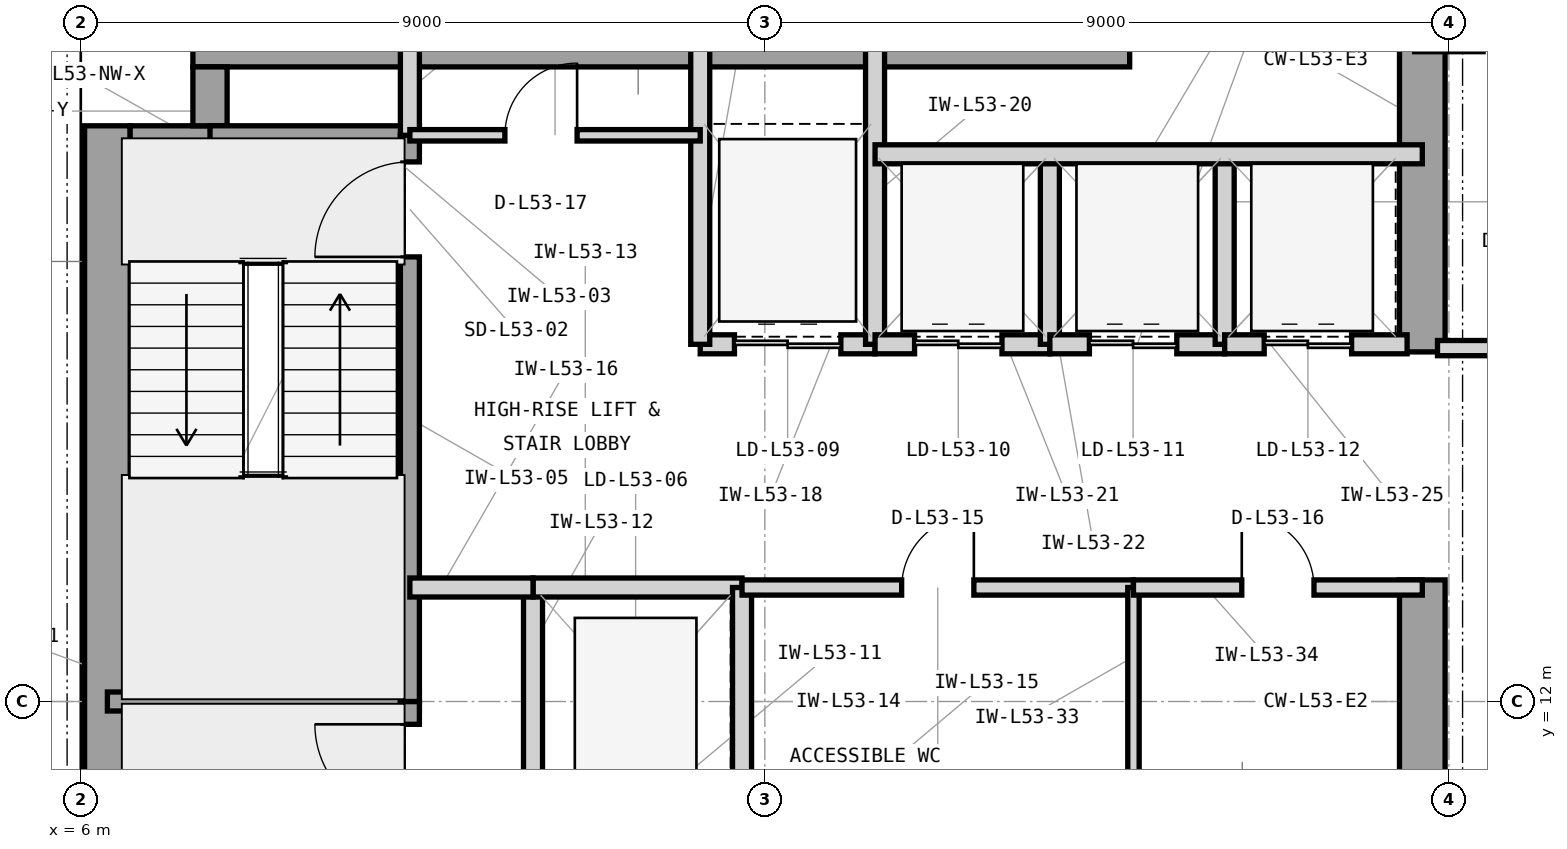
"""IFC4 building model, lengths in metres.
Left out: names, types, materials, properties, quantities, classifications, styles, units other than length and angle.
Written with IfcOpenShell. Run it as: python <this file> out.ifc"""

import sys

from ifc_helpers import new_model, si_unit, direction, frame, frame_2d, origin, place, context, subcontext, project, spatial, rectangle, extrude, element, fill, save


model = new_model("IFC4")
c1 = context("Model", 3, precision=1e-05, world=origin(), true_north=direction((0.0, 1.0)))
c2 = subcontext(c1, "Body", "Model", "MODEL_VIEW")
j1 = project(units=[si_unit("LENGTHUNIT", "METRE"), si_unit("PLANEANGLEUNIT", "RADIAN")], contexts=[c1])
p1 = place(None, origin())
s1 = spatial("IfcSite", under=j1, at=p1, CompositionType="ELEMENT")
p2 = place(p1, origin())
s2 = spatial("IfcBuilding", under=s1, at=p2, CompositionType="ELEMENT")
p3 = place(p2, frame((0.0, 0.0, 219.0)))
s3 = spatial("IfcBuildingStorey", under=s2, at=p3, CompositionType="ELEMENT", Elevation=219.0)
p4 = place(p3, frame((6.35, 4.425, 0.0), z_axis=(0.0, 0.0, 1.0), x_axis=(0.0, 1.0, 0.0)))
e1 = element("IfcWall", 1, at=p4, inside=s3, PredefinedType="SHEAR", context=c2, shape_type="SweptSolid", body=[
    extrude(rectangle(XDim=15.15, YDim=0.6, at=frame_2d((7.575, 0.0))), origin(), (0.0, 0.0, 1.0), 3.9),
])
p5 = place(p3, frame((7.475, 20.65, 0.0), z_axis=(0.0, 0.0, 1.0), x_axis=(1.0, 0.0, 0.0)))
e2 = element("IfcWall", 2, at=p5, inside=s3, PredefinedType="SHEAR", context=c2, shape_type="SweptSolid", body=[
    extrude(rectangle(XDim=12.325, YDim=0.6, at=frame_2d((6.163, 0.0))), origin(), (0.0, 0.0, 1.0), 3.9),
])
p6 = place(p3, frame((23.65, 10.4, 0.0), z_axis=(0.0, 0.0, 1.0), x_axis=(0.0, 1.0, 0.0)))
e3 = element("IfcWall", 3, at=p6, inside=s3, PredefinedType="SHEAR", context=c2, shape_type="SweptSolid", body=[
    extrude(rectangle(XDim=3.2, YDim=0.6, at=frame_2d((1.6, 0.0))), origin(), (0.0, 0.0, 1.0), 3.9),
])
p7 = place(p3, frame((23.65, 16.6, 0.0), z_axis=(0.0, 0.0, 1.0), x_axis=(0.0, 1.0, 0.0)))
e4 = element("IfcWall", 4, at=p7, inside=s3, PredefinedType="SHEAR", context=c2, shape_type="SweptSolid", body=[
    extrude(rectangle(XDim=4.05, YDim=0.6, at=frame_2d((2.025, 0.0))), origin(), (0.0, 0.0, 1.0), 3.9),
])
p8 = place(p3, frame((6.65, 19.35, 0.0), z_axis=(0.0, 0.0, 1.0), x_axis=(1.0, 0.0, 0.0)))
e5 = element("IfcWall", 5, at=p8, inside=s3, PredefinedType="SHEAR", context=c2, shape_type="SweptSolid", body=[
    extrude(rectangle(XDim=1.275, YDim=0.45, at=frame_2d((0.638, 0.0))), origin(), (0.0, 0.0, 1.0), 3.9),
])
p9 = place(p3, frame((7.7, 19.575, 0.0), z_axis=(0.0, 0.0, 1.0), x_axis=(0.0, 1.0, 0.0)))
e6 = element("IfcWall", 6, at=p9, inside=s3, PredefinedType="SHEAR", context=c2, shape_type="SweptSolid", body=[
    extrude(rectangle(XDim=0.775, YDim=0.45, at=frame_2d((0.388, 0.0))), origin(), (0.0, 0.0, 1.0), 3.9),
])
p10 = place(p3, frame((6.35, 12.0, 0.0), z_axis=(0.0, 0.0, 1.0), x_axis=(1.0, 0.0, 0.0)))
e7 = element("IfcWall", 7, at=p10, inside=s3, PredefinedType="SHEAR", context=c2, shape_type="SweptSolid", body=[
    extrude(rectangle(XDim=4.105, YDim=0.25, at=frame_2d((2.052, 0.0))), origin(), (0.0, 0.0, 1.0), 3.9),
])
p11 = place(p3, frame((7.7, 19.45, 0.0), z_axis=(0.0, 0.0, 1.0), x_axis=(1.0, 0.0, 0.0)))
e8 = element("IfcWall", 8, at=p11, inside=s3, PredefinedType="SHEAR", context=c2, shape_type="SweptSolid", body=[
    extrude(rectangle(XDim=2.755, YDim=0.25, at=frame_2d((1.377, 0.0))), origin(), (0.0, 0.0, 1.0), 3.9),
])
p12 = place(p3, frame((10.33, 4.55, 0.0), z_axis=(0.0, 0.0, 1.0), x_axis=(0.0, 1.0, 0.0)))
e9 = element("IfcWall", 9, at=p12, inside=s3, PredefinedType="SHEAR", context=c2, shape_type="SweptSolid", body=[
    extrude(rectangle(XDim=7.45, YDim=0.25, at=frame_2d((3.725, 0.0))), origin(), (0.0, 0.0, 1.0), 3.9),
])
p13 = place(p12, frame((5.9, 0.0, 0.0)))
e10 = element("IfcOpeningElement", 10, at=p13, cuts=e9, PredefinedType="OPENING", context=c2, shape_type="SweptSolid", body=[
    extrude(rectangle(XDim=1.25, YDim=2.2, at=frame_2d((0.625, 1.1))), frame((0.0, 0.135, 0.0), z_axis=(0.0, -1.0, 0.0), x_axis=(1.0, 0.0, 0.0)), (0.0, 0.0, 1.0), 0.27),
])
p14 = place(p3, frame((10.33, 12.0, 0.0), z_axis=(0.0, 0.0, 1.0), x_axis=(0.0, 1.0, 0.0)))
e11 = element("IfcWall", 11, at=p14, inside=s3, PredefinedType="SHEAR", context=c2, shape_type="SweptSolid", body=[
    extrude(rectangle(XDim=7.45, YDim=0.25, at=frame_2d((3.725, 0.0))), origin(), (0.0, 0.0, 1.0), 3.9),
])
p15 = place(p14, frame((5.85, 0.0, 0.0)))
e12 = element("IfcOpeningElement", 12, at=p15, cuts=e11, PredefinedType="OPENING", context=c2, shape_type="SweptSolid", body=[
    extrude(rectangle(XDim=1.25, YDim=2.2, at=frame_2d((0.625, 1.1))), frame((0.0, 0.135, 0.0), z_axis=(0.0, -1.0, 0.0), x_axis=(1.0, 0.0, 0.0)), (0.0, 0.0, 1.0), 0.27),
])
p16 = place(p3, frame((10.33, 19.45, 0.0), z_axis=(0.0, 0.0, 1.0), x_axis=(0.0, 1.0, 0.0)))
e13 = element("IfcWall", 13, at=p16, inside=s3, PredefinedType="PARTITIONING", context=c2, shape_type="SweptSolid", body=[
    extrude(rectangle(XDim=1.2, YDim=0.25, at=frame_2d((0.6, 0.0))), origin(), (0.0, 0.0, 1.0), 3.64),
])
p17 = place(p3, frame((11.95, 10.5, 0.0), z_axis=(0.0, 0.0, 1.0), x_axis=(0.0, 1.0, 0.0)))
e14 = element("IfcWall", 14, at=p17, inside=s3, PredefinedType="PARTITIONING", context=c2, shape_type="SweptSolid", body=[
    extrude(rectangle(XDim=3.0, YDim=0.25, at=frame_2d((1.5, 0.0))), origin(), (0.0, 0.0, 1.0), 3.64),
])
p18 = place(p3, frame((11.95, 13.5, 0.0), z_axis=(0.0, 0.0, 1.0), x_axis=(1.0, 0.0, 0.0)))
e15 = element("IfcWall", 15, at=p18, inside=s3, PredefinedType="PARTITIONING", context=c2, shape_type="SweptSolid", body=[
    extrude(rectangle(XDim=2.75, YDim=0.25, at=frame_2d((1.375, 0.0))), origin(), (0.0, 0.0, 1.0), 3.283),
])
p19 = place(p3, frame((14.7, 10.5, 0.0), z_axis=(0.0, 0.0, 1.0), x_axis=(0.0, 1.0, 0.0)))
e16 = element("IfcWall", 16, at=p19, inside=s3, PredefinedType="PARTITIONING", context=c2, shape_type="SweptSolid", body=[
    extrude(rectangle(XDim=3.0, YDim=0.25, at=frame_2d((1.5, 0.0))), origin(), (0.0, 0.0, 1.0), 3.64),
])
p20 = place(p3, frame((10.33, 13.5, 0.0), z_axis=(0.0, 0.0, 1.0), x_axis=(1.0, 0.0, 0.0)))
e17 = element("IfcWall", 17, at=p20, inside=s3, PredefinedType="PARTITIONING", context=c2, shape_type="SweptSolid", body=[
    extrude(rectangle(XDim=1.62, YDim=0.25, at=frame_2d((0.81, 0.0))), origin(), (0.0, 0.0, 1.0), 3.283),
])
p21 = place(p3, frame((14.15, 16.7, 0.0), z_axis=(0.0, 0.0, 1.0), x_axis=(1.0, 0.0, 0.0)))
e18 = element("IfcWall", 18, at=p21, inside=s3, PredefinedType="PARTITIONING", context=c2, shape_type="SweptSolid", body=[
    extrude(rectangle(XDim=2.3, YDim=0.25, at=frame_2d((1.15, 0.0))), origin(), (0.0, 0.0, 1.0), 3.283),
])
p22 = place(p21, frame((0.45, 0.0, 0.0)))
e19 = element("IfcOpeningElement", 19, at=p22, cuts=e18, PredefinedType="OPENING", context=c2, shape_type="SweptSolid", body=[
    extrude(rectangle(XDim=1.4, YDim=2.35, at=frame_2d((0.7, 1.175))), frame((0.0, 0.135, 0.0), z_axis=(0.0, -1.0, 0.0), x_axis=(1.0, 0.0, 0.0)), (0.0, 0.0, 1.0), 0.27),
])
for number, where, z_axis, x_axis in (
    (20, (14.15, 16.7, 0.0), (0.0, 0.0, 1.0), (0.0, 1.0, 0.0)),
    (21, (16.45, 16.7, 0.0), (0.0, 0.0, 1.0), (0.0, 1.0, 0.0)),
):
    element("IfcWall", number, at=place(p3, frame(where, z_axis=z_axis, x_axis=x_axis)), inside=s3, PredefinedType="PARTITIONING", context=c2, shape_type="SweptSolid", body=[
        extrude(rectangle(XDim=3.95, YDim=0.25, at=frame_2d((1.975, 0.0))), origin(), (0.0, 0.0, 1.0), 3.64),
    ])
p23 = place(p3, frame((16.45, 16.7, 0.0), z_axis=(0.0, 0.0, 1.0), x_axis=(1.0, 0.0, 0.0)))
e22 = element("IfcWall", 22, at=p23, inside=s3, PredefinedType="PARTITIONING", context=c2, shape_type="SweptSolid", body=[
    extrude(rectangle(XDim=2.3, YDim=0.25, at=frame_2d((1.15, 0.0))), origin(), (0.0, 0.0, 1.0), 3.283),
])
p24 = place(p23, frame((0.52, 0.0, 0.0)))
e23 = element("IfcOpeningElement", 23, at=p24, cuts=e22, PredefinedType="OPENING", context=c2, shape_type="SweptSolid", body=[
    extrude(rectangle(XDim=1.15, YDim=2.25, at=frame_2d((0.575, 1.125))), frame((0.0, 0.135, 0.0), z_axis=(0.0, -1.0, 0.0), x_axis=(1.0, 0.0, 0.0)), (0.0, 0.0, 1.0), 0.27),
])
p25 = place(p3, frame((18.75, 16.7, 0.0), z_axis=(0.0, 0.0, 1.0), x_axis=(0.0, 1.0, 0.0)))
e24 = element("IfcWall", 24, at=p25, inside=s3, PredefinedType="PARTITIONING", context=c2, shape_type="SweptSolid", body=[
    extrude(rectangle(XDim=2.5, YDim=0.25, at=frame_2d((1.25, 0.0))), origin(), (0.0, 0.0, 1.0), 3.64),
])
p26 = place(p3, frame((18.75, 16.7, 0.0), z_axis=(0.0, 0.0, 1.0), x_axis=(1.0, 0.0, 0.0)))
e25 = element("IfcWall", 25, at=p26, inside=s3, PredefinedType="PARTITIONING", context=c2, shape_type="SweptSolid", body=[
    extrude(rectangle(XDim=2.3, YDim=0.25, at=frame_2d((1.15, 0.0))), origin(), (0.0, 0.0, 1.0), 3.283),
])
p27 = place(p26, frame((0.52, 0.0, 0.0)))
e26 = element("IfcOpeningElement", 26, at=p27, cuts=e25, PredefinedType="OPENING", context=c2, shape_type="SweptSolid", body=[
    extrude(rectangle(XDim=1.15, YDim=2.25, at=frame_2d((0.575, 1.125))), frame((0.0, 0.135, 0.0), z_axis=(0.0, -1.0, 0.0), x_axis=(1.0, 0.0, 0.0)), (0.0, 0.0, 1.0), 0.27),
])
p28 = place(p3, frame((21.05, 16.7, 0.0), z_axis=(0.0, 0.0, 1.0), x_axis=(0.0, 1.0, 0.0)))
e27 = element("IfcWall", 27, at=p28, inside=s3, PredefinedType="PARTITIONING", context=c2, shape_type="SweptSolid", body=[
    extrude(rectangle(XDim=2.5, YDim=0.25, at=frame_2d((1.25, 0.0))), origin(), (0.0, 0.0, 1.0), 3.64),
])
p29 = place(p3, frame((21.05, 16.7, 0.0), z_axis=(0.0, 0.0, 1.0), x_axis=(1.0, 0.0, 0.0)))
e28 = element("IfcWall", 28, at=p29, inside=s3, PredefinedType="PARTITIONING", context=c2, shape_type="SweptSolid", body=[
    extrude(rectangle(XDim=2.4, YDim=0.25, at=frame_2d((1.2, 0.0))), origin(), (0.0, 0.0, 1.0), 3.283),
])
p30 = place(p29, frame((0.52, 0.0, 0.0)))
e29 = element("IfcOpeningElement", 29, at=p30, cuts=e28, PredefinedType="OPENING", context=c2, shape_type="SweptSolid", body=[
    extrude(rectangle(XDim=1.15, YDim=2.25, at=frame_2d((0.575, 1.125))), frame((0.0, 0.135, 0.0), z_axis=(0.0, -1.0, 0.0), x_axis=(1.0, 0.0, 0.0)), (0.0, 0.0, 1.0), 0.27),
])
p31 = place(p3, frame((16.45, 19.2, 0.0), z_axis=(0.0, 0.0, 1.0), x_axis=(1.0, 0.0, 0.0)))
e30 = element("IfcWall", 30, at=p31, inside=s3, PredefinedType="PARTITIONING", context=c2, shape_type="SweptSolid", body=[
    extrude(rectangle(XDim=7.2, YDim=0.25, at=frame_2d((3.6, 0.0))), origin(), (0.0, 0.0, 1.0), 3.64),
])
p32 = place(p3, frame((14.7, 13.5, 0.0), z_axis=(0.0, 0.0, 1.0), x_axis=(1.0, 0.0, 0.0)))
e31 = element("IfcWall", 31, at=p32, inside=s3, PredefinedType="PARTITIONING", context=c2, shape_type="SweptSolid", body=[
    extrude(rectangle(XDim=5.15, YDim=0.2, at=frame_2d((2.575, 0.0))), origin(), (0.0, 0.0, 1.0), 3.283),
])
p33 = place(p32, frame((2.1, 0.0, 0.0)))
e32 = element("IfcOpeningElement", 32, at=p33, cuts=e31, PredefinedType="OPENING", context=c2, shape_type="SweptSolid", body=[
    extrude(rectangle(XDim=0.95, YDim=2.1, at=frame_2d((0.475, 1.05))), frame((0.0, 0.11, 0.0), z_axis=(0.0, -1.0, 0.0), x_axis=(1.0, 0.0, 0.0)), (0.0, 0.0, 1.0), 0.22),
])
p34 = place(p3, frame((19.85, 9.85, 0.0), z_axis=(0.0, 0.0, 1.0), x_axis=(0.0, 1.0, 0.0)))
e33 = element("IfcWall", 33, at=p34, inside=s3, PredefinedType="PARTITIONING", context=c2, shape_type="SweptSolid", body=[
    extrude(rectangle(XDim=3.65, YDim=0.15, at=frame_2d((1.825, 0.0))), origin(), (0.0, 0.0, 1.0), 3.64),
])
p35 = place(p3, frame((19.85, 13.5, 0.0), z_axis=(0.0, 0.0, 1.0), x_axis=(1.0, 0.0, 0.0)))
e34 = element("IfcWall", 34, at=p35, inside=s3, PredefinedType="PARTITIONING", context=c2, shape_type="SweptSolid", body=[
    extrude(rectangle(XDim=3.8, YDim=0.2, at=frame_2d((1.9, 0.0))), origin(), (0.0, 0.0, 1.0), 3.283),
])
p36 = place(p35, frame((1.425, 0.0, 0.0)))
e35 = element("IfcOpeningElement", 35, at=p36, cuts=e34, PredefinedType="OPENING", context=c2, shape_type="SweptSolid", body=[
    extrude(rectangle(XDim=0.95, YDim=2.1, at=frame_2d((0.475, 1.05))), frame((0.0, 0.11, 0.0), z_axis=(0.0, -1.0, 0.0), x_axis=(1.0, 0.0, 0.0)), (0.0, 0.0, 1.0), 0.22),
])
p37 = place(p3, frame((10.33, 19.45, 0.0), z_axis=(0.0, 0.0, 1.0), x_axis=(1.0, 0.0, 0.0)))
e36 = element("IfcWall", 36, at=p37, inside=s3, PredefinedType="PARTITIONING", context=c2, shape_type="SweptSolid", body=[
    extrude(rectangle(XDim=3.82, YDim=0.15, at=frame_2d((1.91, 0.0))), origin(), (0.0, 0.0, 1.0), 3.64),
])
p38 = place(p37, frame((1.25, 0.0, 0.0)))
e37 = element("IfcOpeningElement", 37, at=p38, cuts=e36, PredefinedType="OPENING", context=c2, shape_type="SweptSolid", body=[
    extrude(rectangle(XDim=0.95, YDim=2.1, at=frame_2d((0.475, 1.05))), frame((0.0, 0.085, 0.0), z_axis=(0.0, -1.0, 0.0), x_axis=(1.0, 0.0, 0.0)), (0.0, 0.0, 1.0), 0.17),
])
p39 = place(p3, frame((23.85, 16.65, 0.0), z_axis=(0.0, 0.0, 1.0), x_axis=(1.0, 0.0, 0.0)))
e38 = element("IfcWall", 38, at=p39, inside=s3, PredefinedType="PARTITIONING", context=c2, shape_type="SweptSolid", body=[
    extrude(rectangle(XDim=2.85, YDim=0.2, at=frame_2d((1.425, 0.0))), origin(), (0.0, 0.0, 1.0), 3.64),
])
p40 = place(p39, frame((0.7, 0.0, 0.0)))
e39 = element("IfcOpeningElement", 39, at=p40, cuts=e38, PredefinedType="OPENING", context=c2, shape_type="SweptSolid", body=[
    extrude(rectangle(XDim=1.0, YDim=2.15, at=frame_2d((0.5, 1.075))), frame((0.0, 0.11, 0.0), z_axis=(0.0, -1.0, 0.0), x_axis=(1.0, 0.0, 0.0)), (0.0, 0.0, 1.0), 0.22),
])
p41 = place(p13, origin())
e40 = element("IfcDoor", 40, at=p41, inside=s3, OperationType="SINGLE_SWING_RIGHT", PredefinedType="DOOR", context=c2, shape_type="SweptSolid", body=[
    extrude(rectangle(XDim=1.25, YDim=2.2, at=frame_2d((0.625, 1.1))), frame((0.0, 0.025, 0.0), z_axis=(0.0, -1.0, 0.0), x_axis=(1.0, 0.0, 0.0)), (0.0, 0.0, 1.0), 0.05),
])
fill(e10, e40)
p42 = place(p15, origin())
e41 = element("IfcDoor", 41, at=p42, inside=s3, OperationType="SINGLE_SWING_LEFT", PredefinedType="DOOR", context=c2, shape_type="SweptSolid", body=[
    extrude(rectangle(XDim=1.25, YDim=2.2, at=frame_2d((0.625, 1.1))), frame((0.0, 0.025, 0.0), z_axis=(0.0, -1.0, 0.0), x_axis=(1.0, 0.0, 0.0)), (0.0, 0.0, 1.0), 0.05),
])
fill(e12, e41)
p43 = place(p22, origin())
e42 = element("IfcDoor", 42, at=p43, inside=s3, OperationType="DOUBLE_DOOR_SLIDING", PredefinedType="DOOR", context=c2, shape_type="SweptSolid", body=[
    extrude(rectangle(XDim=1.4, YDim=2.35, at=frame_2d((0.7, 1.175))), frame((0.0, 0.025, 0.0), z_axis=(0.0, -1.0, 0.0), x_axis=(1.0, 0.0, 0.0)), (0.0, 0.0, 1.0), 0.05),
])
fill(e19, e42)
p44 = place(p24, origin())
e43 = element("IfcDoor", 43, at=p44, inside=s3, OperationType="DOUBLE_DOOR_SLIDING", PredefinedType="DOOR", context=c2, shape_type="SweptSolid", body=[
    extrude(rectangle(XDim=1.15, YDim=2.25, at=frame_2d((0.575, 1.125))), frame((0.0, 0.025, 0.0), z_axis=(0.0, -1.0, 0.0), x_axis=(1.0, 0.0, 0.0)), (0.0, 0.0, 1.0), 0.05),
])
fill(e23, e43)
p45 = place(p27, origin())
e44 = element("IfcDoor", 44, at=p45, inside=s3, OperationType="DOUBLE_DOOR_SLIDING", PredefinedType="DOOR", context=c2, shape_type="SweptSolid", body=[
    extrude(rectangle(XDim=1.15, YDim=2.25, at=frame_2d((0.575, 1.125))), frame((0.0, 0.025, 0.0), z_axis=(0.0, -1.0, 0.0), x_axis=(1.0, 0.0, 0.0)), (0.0, 0.0, 1.0), 0.05),
])
fill(e26, e44)
p46 = place(p30, origin())
e45 = element("IfcDoor", 45, at=p46, inside=s3, OperationType="DOUBLE_DOOR_SLIDING", PredefinedType="DOOR", context=c2, shape_type="SweptSolid", body=[
    extrude(rectangle(XDim=1.15, YDim=2.25, at=frame_2d((0.575, 1.125))), frame((0.0, 0.025, 0.0), z_axis=(0.0, -1.0, 0.0), x_axis=(1.0, 0.0, 0.0)), (0.0, 0.0, 1.0), 0.05),
])
fill(e29, e45)
p47 = place(p33, origin())
e46 = element("IfcDoor", 46, at=p47, inside=s3, OperationType="SINGLE_SWING_RIGHT", PredefinedType="DOOR", context=c2, shape_type="SweptSolid", body=[
    extrude(rectangle(XDim=0.95, YDim=2.1, at=frame_2d((0.475, 1.05))), frame((0.0, 0.025, 0.0), z_axis=(0.0, -1.0, 0.0), x_axis=(1.0, 0.0, 0.0)), (0.0, 0.0, 1.0), 0.05),
])
fill(e32, e46)
p48 = place(p36, origin())
e47 = element("IfcDoor", 47, at=p48, inside=s3, OperationType="SINGLE_SWING_LEFT", PredefinedType="DOOR", context=c2, shape_type="SweptSolid", body=[
    extrude(rectangle(XDim=0.95, YDim=2.1, at=frame_2d((0.475, 1.05))), frame((0.0, 0.025, 0.0), z_axis=(0.0, -1.0, 0.0), x_axis=(1.0, 0.0, 0.0)), (0.0, 0.0, 1.0), 0.05),
])
fill(e35, e47)
p49 = place(p38, origin())
e48 = element("IfcDoor", 48, at=p49, inside=s3, OperationType="SINGLE_SWING_RIGHT", PredefinedType="DOOR", context=c2, shape_type="SweptSolid", body=[
    extrude(rectangle(XDim=0.95, YDim=2.1, at=frame_2d((0.475, 1.05))), frame((0.0, 0.025, 0.0), z_axis=(0.0, -1.0, 0.0), x_axis=(1.0, 0.0, 0.0)), (0.0, 0.0, 1.0), 0.05),
])
fill(e37, e48)
save(model, sys.argv[1])
